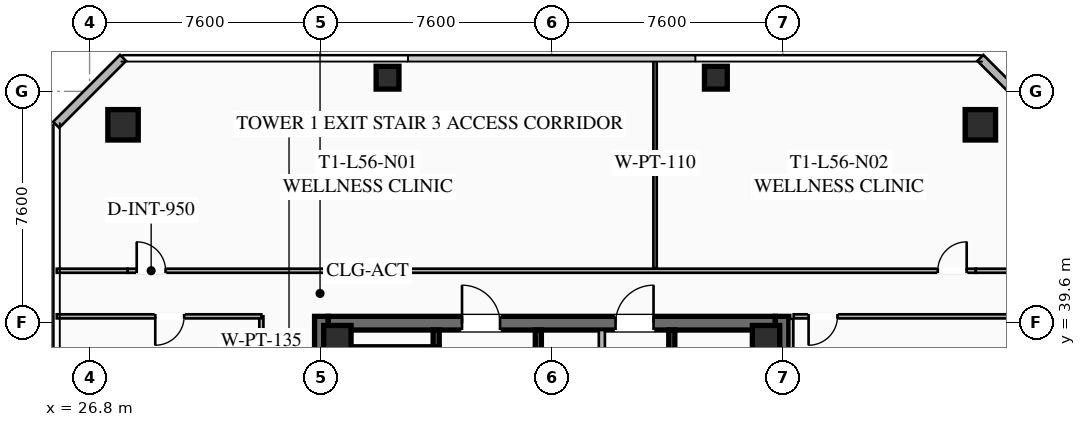
"""IFC4 building model, lengths in metres.
Left out: names, types, materials, properties, quantities, classifications, styles, units other than length and angle.
Written with IfcOpenShell. Run it as: python <this file> out.ifc"""

import sys

from ifc_helpers import new_model, si_unit, direction, frame, frame_2d, origin, origin_2d, place, context, subcontext, project, spatial, rectangle, hollow_rectangle, extrude, element, fill, save


model = new_model("IFC4")
c1 = context("Model", 3, precision=1e-05, world=origin(), true_north=direction((0.0, 1.0)))
c2 = subcontext(c1, "Body", "Model", "MODEL_VIEW")
j1 = project(units=[si_unit("LENGTHUNIT", "METRE"), si_unit("PLANEANGLEUNIT", "RADIAN")], contexts=[c1])
p1 = place(None, origin())
s1 = spatial("IfcSite", under=j1, at=p1, CompositionType="ELEMENT")
p2 = place(p1, origin())
s2 = spatial("IfcBuilding", under=s1, at=p2, CompositionType="ELEMENT")
p3 = place(p2, frame((0.0, 0.0, 207.75)))
s3 = spatial("IfcBuildingStorey", under=s2, at=p3, CompositionType="ELEMENT", Elevation=207.75)
for number, where, z_axis, x_axis in (
    (1, (34.425, 24.2, 0.0), (0.0, 0.0, 1.0), (0.0, 1.0, 0.0)),
    (2, (49.575, 39.8, 0.0), (0.0, 0.0, 1.0), (0.0, -1.0, 0.0)),
):
    element("IfcWall", number, at=place(p3, frame(where, z_axis=z_axis, x_axis=x_axis)), inside=s3, PredefinedType="SHEAR", context=c2, shape_type="SweptSolid", body=[
        extrude(rectangle(XDim=15.6, YDim=0.45, at=frame_2d((7.8, 0.0))), origin(), (0.0, 0.0, 1.0), 3.55),
    ])
p4 = place(p3, frame((34.65, 39.575, 0.0), z_axis=(0.0, 0.0, 1.0), x_axis=(1.0, 0.0, 0.0)))
e3 = element("IfcWall", 3, at=p4, inside=s3, PredefinedType="SHEAR", context=c2, shape_type="SweptSolid", body=[
    extrude(rectangle(XDim=14.7, YDim=0.45, at=frame_2d((7.35, 0.0))), origin(), (0.0, 0.0, 1.0), 3.55),
])
p5 = place(p4, frame((4.4, 0.0, 0.0)))
e4 = element("IfcOpeningElement", 4, at=p5, cuts=e3, PredefinedType="OPENING", context=c2, shape_type="SweptSolid", body=[
    extrude(rectangle(XDim=1.25, YDim=2.25, at=frame_2d((0.625, 1.125))), frame((0.0, 0.235, 0.0), z_axis=(0.0, -1.0, 0.0), x_axis=(1.0, 0.0, 0.0)), (0.0, 0.0, 1.0), 0.47),
])
p6 = place(p4, frame((9.45, 0.0, 0.0)))
e5 = element("IfcOpeningElement", 5, at=p6, cuts=e3, PredefinedType="OPENING", context=c2, shape_type="SweptSolid", body=[
    extrude(rectangle(XDim=1.25, YDim=2.25, at=frame_2d((0.625, 1.125))), frame((0.0, 0.235, 0.0), z_axis=(0.0, -1.0, 0.0), x_axis=(1.0, 0.0, 0.0)), (0.0, 0.0, 1.0), 0.47),
])
for number, where, z_axis, x_axis in (
    (6, (49.05, 39.05, 0.0), (0.0, 0.0, 1.0), (1.0, 0.0, 0.0)),
    (7, (34.95, 39.05, 0.0), (0.0, 0.0, 1.0), (1.0, 0.0, 0.0)),
):
    element("IfcColumn", number, at=place(p3, frame(where, z_axis=z_axis, x_axis=x_axis)), inside=s3, PredefinedType="COLUMN", context=c2, shape_type="SweptSolid", body=[
        extrude(hollow_rectangle(XDim=0.9, YDim=0.9, WallThickness=0.04, at=origin_2d()), origin(), (0.0, 0.0, 1.0), 3.37),
    ])
for number, where, z_axis, x_axis in (
    (8, (56.1, 46.1, 0.0), (0.0, 0.0, 1.0), (1.0, 0.0, 0.0)),
    (9, (27.9, 46.1, 0.0), (0.0, 0.0, 1.0), (1.0, 0.0, 0.0)),
):
    element("IfcColumn", number, at=place(p3, frame(where, z_axis=z_axis, x_axis=x_axis)), inside=s3, PredefinedType="COLUMN", context=c2, shape_type="SweptSolid", body=[
        extrude(hollow_rectangle(XDim=1.0, YDim=1.0, WallThickness=0.04, at=origin_2d()), origin(), (0.0, 0.0, 1.0), 3.37),
    ])
for number, where, z_axis, x_axis in (
    (10, (47.4, 47.65, 0.0), (0.0, 0.0, 1.0), (1.0, 0.0, 0.0)),
    (11, (36.6, 47.65, 0.0), (0.0, 0.0, 1.0), (1.0, 0.0, 0.0)),
):
    element("IfcColumn", number, at=place(p3, frame(where, z_axis=z_axis, x_axis=x_axis)), inside=s3, PredefinedType="COLUMN", context=c2, shape_type="SweptSolid", body=[
        extrude(hollow_rectangle(XDim=0.75, YDim=0.75, WallThickness=0.032, at=origin_2d()), origin(), (0.0, 0.0, 1.0), 3.37),
    ])
for number, where, z_axis, x_axis in (
    (12, (25.7, 46.1, 0.0), (0.0, 0.0, 1.0), (0.707, 0.707, 0.0)),
    (13, (56.1, 48.3, 0.0), (0.0, 0.0, 1.0), (0.707, -0.707, 0.0)),
):
    element("IfcWall", number, at=place(p3, frame(where, z_axis=z_axis, x_axis=x_axis)), inside=s3, PredefinedType="SOLIDWALL", context=c2, shape_type="SweptSolid", body=[
        extrude(rectangle(XDim=3.111, YDim=0.28, at=frame_2d((1.556, 0.0))), origin(), (0.0, 0.0, 1.0), 3.37),
    ])
p7 = place(p3, frame((38.2, 31.2, 0.0), z_axis=(0.0, 0.0, 1.0), x_axis=(0.0, 1.0, 0.0)))
e14 = element("IfcWall", 14, at=p7, inside=s3, PredefinedType="SHEAR", context=c2, shape_type="SweptSolid", body=[
    extrude(rectangle(XDim=8.15, YDim=0.2, at=frame_2d((4.075, 0.0))), origin(), (0.0, 0.0, 1.0), 3.37),
])
p8 = place(p7, frame((0.45, 0.0, 0.0)))
e15 = element("IfcOpeningElement", 15, at=p8, cuts=e14, PredefinedType="OPENING", context=c2, shape_type="SweptSolid", body=[
    extrude(rectangle(XDim=1.15, YDim=2.2, at=frame_2d((0.575, 1.1))), frame((0.0, 0.11, 0.0), z_axis=(0.0, -1.0, 0.0), x_axis=(1.0, 0.0, 0.0)), (0.0, 0.0, 1.0), 0.22),
])
p9 = place(p3, frame((41.56, 24.65, 0.0), z_axis=(0.0, 0.0, 1.0), x_axis=(0.0, 1.0, 0.0)))
e16 = element("IfcWall", 16, at=p9, inside=s3, PredefinedType="SHEAR", context=c2, shape_type="SweptSolid", body=[
    extrude(rectangle(XDim=14.7, YDim=0.2, at=frame_2d((7.35, 0.0))), origin(), (0.0, 0.0, 1.0), 3.37),
])
p10 = place(p3, frame((45.95, 39.35, 0.0), z_axis=(0.0, 0.0, 1.0), x_axis=(0.0, -1.0, 0.0)))
e17 = element("IfcWall", 17, at=p10, inside=s3, PredefinedType="SHEAR", context=c2, shape_type="SweptSolid", body=[
    extrude(rectangle(XDim=6.55, YDim=0.2, at=frame_2d((3.275, 0.0))), origin(), (0.0, 0.0, 1.0), 3.37),
])
p11 = place(p10, frame((5.075, 0.0, 0.0)))
e18 = element("IfcOpeningElement", 18, at=p11, cuts=e17, PredefinedType="OPENING", context=c2, shape_type="SweptSolid", body=[
    extrude(rectangle(XDim=1.1, YDim=2.2, at=frame_2d((0.55, 1.1))), frame((0.0, 0.11, 0.0), z_axis=(0.0, -1.0, 0.0), x_axis=(1.0, 0.0, 0.0)), (0.0, 0.0, 1.0), 0.22),
])
p12 = place(p10, frame((3.025, 0.0, 0.0)))
e19 = element("IfcOpeningElement", 19, at=p12, cuts=e17, PredefinedType="OPENING", context=c2, shape_type="SweptSolid", body=[
    extrude(rectangle(XDim=1.1, YDim=2.2, at=frame_2d((0.55, 1.1))), frame((0.0, 0.11, 0.0), z_axis=(0.0, -1.0, 0.0), x_axis=(1.0, 0.0, 0.0)), (0.0, 0.0, 1.0), 0.22),
])
p13 = place(p10, frame((1.025, 0.0, 0.0)))
e20 = element("IfcOpeningElement", 20, at=p13, cuts=e17, PredefinedType="OPENING", context=c2, shape_type="SweptSolid", body=[
    extrude(rectangle(XDim=1.1, YDim=2.2, at=frame_2d((0.55, 1.1))), frame((0.0, 0.11, 0.0), z_axis=(0.0, -1.0, 0.0), x_axis=(1.0, 0.0, 0.0)), (0.0, 0.0, 1.0), 0.22),
])
p14 = place(p3, frame((43.65, 32.35, 0.0), z_axis=(0.0, 0.0, 1.0), x_axis=(0.0, 1.0, 0.0)))
e21 = element("IfcWall", 21, at=p14, inside=s3, PredefinedType="SOLIDWALL", context=c2, shape_type="SweptSolid", body=[
    extrude(rectangle(XDim=7.0, YDim=0.2, at=frame_2d((3.5, 0.0))), origin(), (0.0, 0.0, 1.0), 2.723),
])
p15 = place(p14, frame((0.85, 0.0, 0.0)))
e22 = element("IfcOpeningElement", 22, at=p15, cuts=e21, PredefinedType="OPENING", context=c2, shape_type="SweptSolid", body=[
    extrude(rectangle(XDim=0.95, YDim=2.05, at=frame_2d((0.475, 1.025))), frame((0.0, 0.11, 0.0), z_axis=(0.0, -1.0, 0.0), x_axis=(1.0, 0.0, 0.0)), (0.0, 0.0, 1.0), 0.22),
])
p16 = place(p14, frame((4.85, 0.0, 0.0)))
e23 = element("IfcOpeningElement", 23, at=p16, cuts=e21, PredefinedType="OPENING", context=c2, shape_type="SweptSolid", body=[
    extrude(rectangle(XDim=0.95, YDim=2.05, at=frame_2d((0.475, 1.025))), frame((0.0, 0.11, 0.0), z_axis=(0.0, -1.0, 0.0), x_axis=(1.0, 0.0, 0.0)), (0.0, 0.0, 1.0), 0.22),
])
p17 = place(p3, frame((32.45, 35.4, 0.0), z_axis=(0.0, 0.0, 1.0), x_axis=(0.0, 1.0, 0.0)))
e24 = element("IfcWall", 24, at=p17, inside=s3, PredefinedType="PARTITIONING", context=c2, shape_type="SweptSolid", body=[
    extrude(rectangle(XDim=4.4, YDim=0.135, at=frame_2d((2.2, 0.0))), origin(), (0.0, 0.0, 1.0), 2.723),
])
p18 = place(p3, frame((28.05, 41.3, 0.0), z_axis=(0.0, 0.0, 1.0), x_axis=(1.0, 0.0, 0.0)))
e25 = element("IfcWall", 25, at=p18, inside=s3, PredefinedType="PARTITIONING", context=c2, shape_type="SweptSolid", body=[
    extrude(rectangle(XDim=27.9, YDim=0.135, at=frame_2d((13.95, 0.0))), origin(), (0.0, 0.0, 1.0), 2.723),
])
p19 = place(p18, frame((0.3, 0.0, 0.0)))
e26 = element("IfcOpeningElement", 26, at=p19, cuts=e25, PredefinedType="OPENING", context=c2, shape_type="SweptSolid", body=[
    extrude(rectangle(XDim=0.95, YDim=2.05, at=frame_2d((0.475, 1.025))), frame((0.0, 0.077, 0.0), z_axis=(0.0, -1.0, 0.0), x_axis=(1.0, 0.0, 0.0)), (0.0, 0.0, 1.0), 0.155),
])
p20 = place(p18, frame((26.65, 0.0, 0.0)))
e27 = element("IfcOpeningElement", 27, at=p20, cuts=e25, PredefinedType="OPENING", context=c2, shape_type="SweptSolid", body=[
    extrude(rectangle(XDim=0.95, YDim=2.05, at=frame_2d((0.475, 1.025))), frame((0.0, 0.077, 0.0), z_axis=(0.0, -1.0, 0.0), x_axis=(1.0, 0.0, 0.0)), (0.0, 0.0, 1.0), 0.155),
])
for number, where, z_axis, x_axis in (
    (28, (25.72, 41.3, 0.0), (0.0, 0.0, 1.0), (1.0, 0.0, 0.0)),
    (29, (55.95, 41.3, 0.0), (0.0, 0.0, 1.0), (1.0, 0.0, 0.0)),
):
    element("IfcWall", number, at=place(p3, frame(where, z_axis=z_axis, x_axis=x_axis)), inside=s3, PredefinedType="PARTITIONING", context=c2, shape_type="SweptSolid", body=[
        extrude(rectangle(XDim=2.33, YDim=0.135, at=frame_2d((1.165, 0.0))), origin(), (0.0, 0.0, 1.0), 2.723),
    ])
p21 = place(p3, frame((45.4, 41.38, 0.0), z_axis=(0.0, 0.0, 1.0), x_axis=(0.0, 1.0, 0.0)))
e30 = element("IfcWall", 30, at=p21, inside=s3, PredefinedType="PARTITIONING", context=c2, shape_type="SweptSolid", body=[
    extrude(rectangle(XDim=6.9, YDim=0.11, at=frame_2d((3.45, 0.0))), origin(), (0.0, 0.0, 1.0), 2.723),
])
p22 = place(p3, frame((49.88, 39.72, 0.0), z_axis=(0.0, 0.0, 1.0), x_axis=(0.0, -1.0, 0.0)))
e31 = element("IfcWall", 31, at=p22, inside=s3, PredefinedType="PARTITIONING", context=c2, shape_type="SweptSolid", body=[
    extrude(rectangle(XDim=15.44, YDim=0.135, at=frame_2d((7.72, 0.0))), origin(), (0.0, 0.0, 1.0), 2.723),
])
p23 = place(p3, frame((58.28, 39.8, 0.0), z_axis=(0.0, 0.0, 1.0), x_axis=(-1.0, 0.0, 0.0)))
e32 = element("IfcWall", 32, at=p23, inside=s3, PredefinedType="PARTITIONING", context=c2, shape_type="SweptSolid", body=[
    extrude(rectangle(XDim=8.32, YDim=0.135, at=frame_2d((4.16, 0.0))), origin(), (0.0, 0.0, 1.0), 2.723),
])
p24 = place(p23, frame((6.88, 0.0, 0.0)))
e33 = element("IfcOpeningElement", 33, at=p24, cuts=e32, PredefinedType="OPENING", context=c2, shape_type="SweptSolid", body=[
    extrude(rectangle(XDim=0.95, YDim=2.05, at=frame_2d((0.475, 1.025))), frame((0.0, 0.077, 0.0), z_axis=(0.0, -1.0, 0.0), x_axis=(1.0, 0.0, 0.0)), (0.0, 0.0, 1.0), 0.155),
])
p25 = place(p3, frame((32.45, 39.8, 0.0), z_axis=(0.0, 0.0, 1.0), x_axis=(-1.0, 0.0, 0.0)))
e34 = element("IfcWall", 34, at=p25, inside=s3, PredefinedType="PARTITIONING", context=c2, shape_type="SweptSolid", body=[
    extrude(rectangle(XDim=6.73, YDim=0.135, at=frame_2d((3.365, 0.0))), origin(), (0.0, 0.0, 1.0), 2.723),
])
p26 = place(p25, frame((2.54, 0.0, 0.0)))
e35 = element("IfcOpeningElement", 35, at=p26, cuts=e34, PredefinedType="OPENING", context=c2, shape_type="SweptSolid", body=[
    extrude(rectangle(XDim=0.95, YDim=2.05, at=frame_2d((0.475, 1.025))), frame((0.0, 0.077, 0.0), z_axis=(0.0, -1.0, 0.0), x_axis=(1.0, 0.0, 0.0)), (0.0, 0.0, 1.0), 0.155),
])
p27 = place(p5, origin())
e36 = element("IfcDoor", 36, at=p27, inside=s3, OperationType="SINGLE_SWING_LEFT", PredefinedType="DOOR", context=c2, shape_type="SweptSolid", body=[
    extrude(rectangle(XDim=1.25, YDim=2.25, at=frame_2d((0.625, 1.125))), frame((0.0, 0.025, 0.0), z_axis=(0.0, -1.0, 0.0), x_axis=(1.0, 0.0, 0.0)), (0.0, 0.0, 1.0), 0.05),
])
fill(e4, e36)
p28 = place(p6, origin())
e37 = element("IfcDoor", 37, at=p28, inside=s3, OperationType="SINGLE_SWING_RIGHT", PredefinedType="DOOR", context=c2, shape_type="SweptSolid", body=[
    extrude(rectangle(XDim=1.25, YDim=2.25, at=frame_2d((0.625, 1.125))), frame((0.0, 0.025, 0.0), z_axis=(0.0, -1.0, 0.0), x_axis=(1.0, 0.0, 0.0)), (0.0, 0.0, 1.0), 0.05),
])
fill(e5, e37)
p29 = place(p19, origin())
e38 = element("IfcDoor", 38, at=p29, inside=s3, OperationType="SINGLE_SWING_LEFT", PredefinedType="DOOR", context=c2, shape_type="SweptSolid", body=[
    extrude(rectangle(XDim=0.95, YDim=2.05, at=frame_2d((0.475, 1.025))), frame((0.0, 0.025, 0.0), z_axis=(0.0, -1.0, 0.0), x_axis=(1.0, 0.0, 0.0)), (0.0, 0.0, 1.0), 0.05),
])
fill(e26, e38)
p30 = place(p20, origin())
e39 = element("IfcDoor", 39, at=p30, inside=s3, OperationType="SINGLE_SWING_RIGHT", PredefinedType="DOOR", context=c2, shape_type="SweptSolid", body=[
    extrude(rectangle(XDim=0.95, YDim=2.05, at=frame_2d((0.475, 1.025))), frame((0.0, 0.025, 0.0), z_axis=(0.0, -1.0, 0.0), x_axis=(1.0, 0.0, 0.0)), (0.0, 0.0, 1.0), 0.05),
])
fill(e27, e39)
p31 = place(p24, origin())
e40 = element("IfcDoor", 40, at=p31, inside=s3, OperationType="SINGLE_SWING_RIGHT", PredefinedType="DOOR", context=c2, shape_type="SweptSolid", body=[
    extrude(rectangle(XDim=0.95, YDim=2.05, at=frame_2d((0.475, 1.025))), frame((0.0, 0.025, 0.0), z_axis=(0.0, -1.0, 0.0), x_axis=(1.0, 0.0, 0.0)), (0.0, 0.0, 1.0), 0.05),
])
fill(e33, e40)
p32 = place(p26, origin())
e41 = element("IfcDoor", 41, at=p32, inside=s3, OperationType="SINGLE_SWING_RIGHT", PredefinedType="DOOR", context=c2, shape_type="SweptSolid", body=[
    extrude(rectangle(XDim=0.95, YDim=2.05, at=frame_2d((0.475, 1.025))), frame((0.0, 0.025, 0.0), z_axis=(0.0, -1.0, 0.0), x_axis=(1.0, 0.0, 0.0)), (0.0, 0.0, 1.0), 0.05),
])
fill(e35, e41)
save(model, sys.argv[1])
